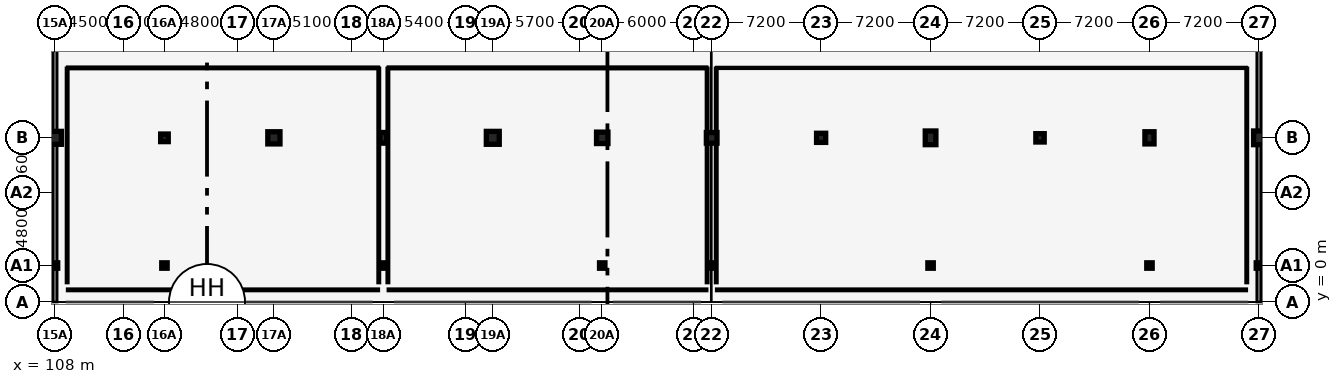
"""IFC4 building model, lengths in metres.
Left out: names, types, materials, properties, quantities, classifications, styles, units other than length and angle.
Written with IfcOpenShell. Run it as: python <this file> out.ifc"""

import sys

from ifc_helpers import new_model, si_unit, direction, frame, frame_2d, origin, origin_2d, place, context, subcontext, project, spatial, rectangle, circle, hollow_circle, extrude, element, fill, save


model = new_model("IFC4")
c1 = context("Model", 3, precision=1e-05, world=origin(), true_north=direction((0.0, 1.0)))
c2 = subcontext(c1, "Body", "Model", "MODEL_VIEW")
j1 = project(units=[si_unit("LENGTHUNIT", "METRE"), si_unit("PLANEANGLEUNIT", "RADIAN")], contexts=[c1])
p1 = place(None, origin())
s1 = spatial("IfcSite", under=j1, at=p1, CompositionType="ELEMENT")
p2 = place(p1, origin())
s2 = spatial("IfcBuilding", under=s1, at=p2, CompositionType="ELEMENT")
p3 = place(p2, frame((0.0, 0.0, 9.0)))
s3 = spatial("IfcBuildingStorey", under=s2, at=p3, CompositionType="ELEMENT", Elevation=9.0)
p4 = place(p3, frame((108.0, 10.8, 0.0), z_axis=(0.0, 0.0, 1.0), x_axis=(1.0, 0.0, 0.0)))
e1 = element("IfcColumn", 1, at=p4, inside=s3, PredefinedType="COLUMN", context=c2, shape_type="SweptSolid", body=[
    extrude(rectangle(XDim=0.85, YDim=0.85, at=origin_2d()), origin(), (0.0, 0.0, 1.0), 4.2),
])
p5 = place(p3, frame((115.2, 10.8, 0.0), z_axis=(0.0, 0.0, 1.0), x_axis=(1.0, 0.0, 0.0)))
e2 = element("IfcColumn", 2, at=p5, inside=s3, PredefinedType="COLUMN", context=c2, shape_type="SweptSolid", body=[
    extrude(rectangle(XDim=0.5, YDim=0.5, at=origin_2d()), origin(), (0.0, 0.0, 1.0), 4.2),
])
p6 = place(p3, frame((122.4, 10.8, 0.0), z_axis=(0.0, 0.0, 1.0), x_axis=(1.0, 0.0, 0.0)))
e3 = element("IfcColumn", 3, at=p6, inside=s3, PredefinedType="COLUMN", context=c2, shape_type="SweptSolid", body=[
    extrude(rectangle(XDim=0.8, YDim=0.8, at=origin_2d()), origin(), (0.0, 0.0, 1.0), 4.2),
])
p7 = place(p3, frame((129.6, 10.8, 0.0), z_axis=(0.0, 0.0, 1.0), x_axis=(1.0, 0.0, 0.0)))
e4 = element("IfcColumn", 4, at=p7, inside=s3, PredefinedType="COLUMN", context=c2, shape_type="SweptSolid", body=[
    extrude(rectangle(XDim=0.45, YDim=0.7, at=origin_2d()), origin(), (0.0, 0.0, 1.0), 4.2),
])
p8 = place(p3, frame((136.8, 10.8, 0.0), z_axis=(0.0, 0.0, 1.0), x_axis=(1.0, 0.0, 0.0)))
e5 = element("IfcColumn", 5, at=p8, inside=s3, PredefinedType="COLUMN", context=c2, shape_type="SweptSolid", body=[
    extrude(rectangle(XDim=0.85, YDim=0.85, at=origin_2d()), origin(), (0.0, 0.0, 1.0), 4.2),
])
p9 = place(p3, frame((144.0, 10.8, 0.0), z_axis=(0.0, 0.0, 1.0), x_axis=(1.0, 0.0, 0.0)))
e6 = element("IfcColumn", 6, at=p9, inside=s3, PredefinedType="COLUMN", context=c2, shape_type="SweptSolid", body=[
    extrude(circle(Radius=0.375, at=origin_2d()), origin(), (0.0, 0.0, 1.0), 4.2),
])
p10 = place(p3, frame((151.2, 10.8, 0.0), z_axis=(0.0, 0.0, 1.0), x_axis=(1.0, 0.0, 0.0)))
e7 = element("IfcColumn", 7, at=p10, inside=s3, PredefinedType="COLUMN", context=c2, shape_type="SweptSolid", body=[
    extrude(rectangle(XDim=0.7, YDim=0.7, at=origin_2d()), origin(), (0.0, 0.0, 1.0), 4.2),
])
p11 = place(p3, frame((158.4, 10.8, 0.0), z_axis=(0.0, 0.0, 1.0), x_axis=(1.0, 0.0, 0.0)))
e8 = element("IfcColumn", 8, at=p11, inside=s3, PredefinedType="COLUMN", context=c2, shape_type="SweptSolid", body=[
    extrude(circle(Radius=0.3, at=origin_2d()), origin(), (0.0, 0.0, 1.0), 4.2),
])
p12 = place(p3, frame((165.6, 10.8, 0.0), z_axis=(0.0, 0.0, 1.0), x_axis=(1.0, 0.0, 0.0)))
e9 = element("IfcColumn", 9, at=p12, inside=s3, PredefinedType="COLUMN", context=c2, shape_type="SweptSolid", body=[
    extrude(rectangle(XDim=0.7, YDim=0.9, at=origin_2d()), origin(), (0.0, 0.0, 1.0), 4.2),
])
p13 = place(p3, frame((172.8, 10.8, 0.0), z_axis=(0.0, 0.0, 1.0), x_axis=(1.0, 0.0, 0.0)))
e10 = element("IfcColumn", 10, at=p13, inside=s3, PredefinedType="COLUMN", context=c2, shape_type="SweptSolid", body=[
    extrude(rectangle(XDim=0.55, YDim=0.55, at=origin_2d()), origin(), (0.0, 0.0, 1.0), 4.2),
])
p14 = place(p3, frame((180.0, 10.8, 0.0), z_axis=(0.0, 0.0, 1.0), x_axis=(1.0, 0.0, 0.0)))
e11 = element("IfcColumn", 11, at=p14, inside=s3, PredefinedType="COLUMN", context=c2, shape_type="SweptSolid", body=[
    extrude(rectangle(XDim=0.6, YDim=0.8, at=origin_2d()), origin(), (0.0, 0.0, 1.0), 4.2),
])
p15 = place(p3, frame((187.2, 10.8, 0.0), z_axis=(0.0, 0.0, 1.0), x_axis=(1.0, 0.0, 0.0)))
e12 = element("IfcColumn", 12, at=p15, inside=s3, PredefinedType="COLUMN", context=c2, shape_type="SweptSolid", body=[
    extrude(rectangle(XDim=0.7, YDim=0.9, at=origin_2d()), origin(), (0.0, 0.0, 1.0), 4.2),
])
for number, where, z_axis, x_axis in (
    (13, (115.2, 2.4, 0.0), (0.0, 0.0, 1.0), (1.0, 0.0, 0.0)),
    (14, (129.6, 2.4, 0.0), (0.0, 0.0, 1.0), (1.0, 0.0, 0.0)),
    (15, (144.0, 2.4, 0.0), (0.0, 0.0, 1.0), (1.0, 0.0, 0.0)),
    (16, (151.2, 2.4, 0.0), (0.0, 0.0, 1.0), (1.0, 0.0, 0.0)),
    (17, (165.6, 2.4, 0.0), (0.0, 0.0, 1.0), (1.0, 0.0, 0.0)),
    (18, (180.0, 2.4, 0.0), (0.0, 0.0, 1.0), (1.0, 0.0, 0.0)),
    (19, (108.0, 2.4, 0.0), (0.0, 0.0, 1.0), (1.0, 0.0, 0.0)),
    (20, (187.2, 2.4, 0.0), (0.0, 0.0, 1.0), (1.0, 0.0, 0.0)),
):
    element("IfcColumn", number, at=place(p3, frame(where, z_axis=z_axis, x_axis=x_axis)), inside=s3, PredefinedType="COLUMN", context=c2, shape_type="SweptSolid", body=[
        extrude(hollow_circle(Radius=0.178, WallThickness=0.013, at=origin_2d()), origin(), (0.0, 0.0, 1.0), 4.2),
    ])
p16 = place(p3, frame((108.0, 54.0, 0.0), z_axis=(0.0, 0.0, 1.0), x_axis=(0.0, -1.0, 0.0)))
e21 = element("IfcWall", 21, at=p16, inside=s3, PredefinedType="SOLIDWALL", context=c2, shape_type="SweptSolid", body=[
    extrude(rectangle(XDim=54.0, YDim=0.28, at=frame_2d((27.0, 0.0))), origin(), (0.0, 0.0, 1.0), 3.4),
])
p17 = place(p16, frame((2.2, 0.0, 0.78)))
e22 = element("IfcOpeningElement", 22, at=p17, cuts=e21, PredefinedType="OPENING", context=c2, shape_type="SweptSolid", body=[
    extrude(rectangle(XDim=1.25, YDim=1.7, at=frame_2d((0.625, 0.85))), frame((0.0, 0.15, 0.0), z_axis=(0.0, -1.0, 0.0), x_axis=(1.0, 0.0, 0.0)), (0.0, 0.0, 1.0), 0.3),
])
p18 = place(p16, frame((16.6, 0.0, 0.78)))
e23 = element("IfcOpeningElement", 23, at=p18, cuts=e21, PredefinedType="OPENING", context=c2, shape_type="SweptSolid", body=[
    extrude(rectangle(XDim=1.5, YDim=1.75, at=frame_2d((0.75, 0.875))), frame((0.0, 0.15, 0.0), z_axis=(0.0, -1.0, 0.0), x_axis=(1.0, 0.0, 0.0)), (0.0, 0.0, 1.0), 0.3),
])
p19 = place(p16, frame((23.8, 0.0, 0.78)))
e24 = element("IfcOpeningElement", 24, at=p19, cuts=e21, PredefinedType="OPENING", context=c2, shape_type="SweptSolid", body=[
    extrude(rectangle(XDim=1.65, YDim=1.8, at=frame_2d((0.825, 0.9))), frame((0.0, 0.15, 0.0), z_axis=(0.0, -1.0, 0.0), x_axis=(1.0, 0.0, 0.0)), (0.0, 0.0, 1.0), 0.3),
])
p20 = place(p16, frame((31.0, 0.0, 0.78)))
e25 = element("IfcOpeningElement", 25, at=p20, cuts=e21, PredefinedType="OPENING", context=c2, shape_type="SweptSolid", body=[
    extrude(rectangle(XDim=1.95, YDim=1.8, at=frame_2d((0.975, 0.9))), frame((0.0, 0.15, 0.0), z_axis=(0.0, -1.0, 0.0), x_axis=(1.0, 0.0, 0.0)), (0.0, 0.0, 1.0), 0.3),
])
p21 = place(p16, frame((38.2, 0.0, 0.78)))
e26 = element("IfcOpeningElement", 26, at=p21, cuts=e21, PredefinedType="OPENING", context=c2, shape_type="SweptSolid", body=[
    extrude(rectangle(XDim=2.1, YDim=1.8, at=frame_2d((1.05, 0.9))), frame((0.0, 0.15, 0.0), z_axis=(0.0, -1.0, 0.0), x_axis=(1.0, 0.0, 0.0)), (0.0, 0.0, 1.0), 0.3),
])
p22 = place(p3, frame((187.2, 0.0, 0.0), z_axis=(0.0, 0.0, 1.0), x_axis=(0.0, 1.0, 0.0)))
e27 = element("IfcWall", 27, at=p22, inside=s3, PredefinedType="SOLIDWALL", context=c2, shape_type="SweptSolid", body=[
    extrude(rectangle(XDim=86.4, YDim=0.28, at=frame_2d((43.2, 0.0))), origin(), (0.0, 0.0, 1.0), 3.4),
])
p23 = place(p22, frame((38.2, 0.0, 0.78)))
e28 = element("IfcOpeningElement", 28, at=p23, cuts=e27, PredefinedType="OPENING", context=c2, shape_type="SweptSolid", body=[
    extrude(rectangle(XDim=1.25, YDim=1.7, at=frame_2d((0.625, 0.85))), frame((0.0, 0.15, 0.0), z_axis=(0.0, -1.0, 0.0), x_axis=(1.0, 0.0, 0.0)), (0.0, 0.0, 1.0), 0.3),
])
p24 = place(p22, frame((45.4, 0.0, 0.78)))
e29 = element("IfcOpeningElement", 29, at=p24, cuts=e27, PredefinedType="OPENING", context=c2, shape_type="SweptSolid", body=[
    extrude(rectangle(XDim=1.35, YDim=1.75, at=frame_2d((0.675, 0.875))), frame((0.0, 0.15, 0.0), z_axis=(0.0, -1.0, 0.0), x_axis=(1.0, 0.0, 0.0)), (0.0, 0.0, 1.0), 0.3),
])
p25 = place(p22, frame((59.8, 0.0, 0.78)))
e30 = element("IfcOpeningElement", 30, at=p25, cuts=e27, PredefinedType="OPENING", context=c2, shape_type="SweptSolid", body=[
    extrude(rectangle(XDim=1.65, YDim=1.8, at=frame_2d((0.825, 0.9))), frame((0.0, 0.15, 0.0), z_axis=(0.0, -1.0, 0.0), x_axis=(1.0, 0.0, 0.0)), (0.0, 0.0, 1.0), 0.3),
])
p26 = place(p22, frame((67.0, 0.0, 0.78)))
e31 = element("IfcOpeningElement", 31, at=p26, cuts=e27, PredefinedType="OPENING", context=c2, shape_type="SweptSolid", body=[
    extrude(rectangle(XDim=1.95, YDim=1.8, at=frame_2d((0.975, 0.9))), frame((0.0, 0.15, 0.0), z_axis=(0.0, -1.0, 0.0), x_axis=(1.0, 0.0, 0.0)), (0.0, 0.0, 1.0), 0.3),
])
p27 = place(p22, frame((74.2, 0.0, 0.78)))
e32 = element("IfcOpeningElement", 32, at=p27, cuts=e27, PredefinedType="OPENING", context=c2, shape_type="SweptSolid", body=[
    extrude(rectangle(XDim=2.1, YDim=1.8, at=frame_2d((1.05, 0.9))), frame((0.0, 0.15, 0.0), z_axis=(0.0, -1.0, 0.0), x_axis=(1.0, 0.0, 0.0)), (0.0, 0.0, 1.0), 0.3),
])
p28 = place(p3, frame((129.3, 0.8, 0.0), z_axis=(0.0, 0.0, 1.0), x_axis=(-1.0, 0.0, 0.0)))
e33 = element("IfcWall", 33, at=p28, inside=s3, PredefinedType="PARTITIONING", context=c2, shape_type="SweptSolid", body=[
    extrude(rectangle(XDim=20.5, YDim=0.15, at=frame_2d((10.25, 0.0))), origin(), (0.0, 0.0, 1.0), 3.502),
])
p29 = place(p3, frame((129.3, 1.25, 0.0), z_axis=(0.0, 0.0, 1.0), x_axis=(0.0, 1.0, 0.0)))
e34 = element("IfcWall", 34, at=p29, inside=s3, PredefinedType="PARTITIONING", context=c2, shape_type="SweptSolid", body=[
    extrude(rectangle(XDim=14.15, YDim=0.15, at=frame_2d((7.075, 0.0))), origin(), (0.0, 0.0, 1.0), 3.244),
])
p30 = place(p3, frame((108.8, 15.4, 0.0), z_axis=(0.0, 0.0, 1.0), x_axis=(0.0, -1.0, 0.0)))
e35 = element("IfcWall", 35, at=p30, inside=s3, PredefinedType="PARTITIONING", context=c2, shape_type="SweptSolid", body=[
    extrude(rectangle(XDim=14.15, YDim=0.15, at=frame_2d((7.075, 0.0))), origin(), (0.0, 0.0, 1.0), 3.002),
])
p31 = place(p3, frame((108.8, 15.4, 0.0), z_axis=(0.0, 0.0, 1.0), x_axis=(1.0, 0.0, 0.0)))
e36 = element("IfcWall", 36, at=p31, inside=s3, PredefinedType="PARTITIONING", context=c2, shape_type="SweptSolid", body=[
    extrude(rectangle(XDim=20.5, YDim=0.15, at=frame_2d((10.25, 0.0))), origin(), (0.0, 0.0, 1.0), 3.357),
])
p32 = place(p31, frame((9.765, 0.0, 0.0)))
e37 = element("IfcOpeningElement", 37, at=p32, cuts=e36, PredefinedType="OPENING", context=c2, shape_type="SweptSolid", body=[
    extrude(rectangle(XDim=0.97, YDim=2.15, at=frame_2d((0.485, 1.075))), frame((0.0, 0.085, 0.0), z_axis=(0.0, -1.0, 0.0), x_axis=(1.0, 0.0, 0.0)), (0.0, 0.0, 1.0), 0.17),
])
p33 = place(p3, frame((150.9, 0.8, 0.0), z_axis=(0.0, 0.0, 1.0), x_axis=(-1.0, 0.0, 0.0)))
e38 = element("IfcWall", 38, at=p33, inside=s3, PredefinedType="PARTITIONING", context=c2, shape_type="SweptSolid", body=[
    extrude(rectangle(XDim=21.0, YDim=0.15, at=frame_2d((10.5, 0.0))), origin(), (0.0, 0.0, 1.0), 3.502),
])
p34 = place(p3, frame((150.9, 1.25, 0.0), z_axis=(0.0, 0.0, 1.0), x_axis=(0.0, 1.0, 0.0)))
e39 = element("IfcWall", 39, at=p34, inside=s3, PredefinedType="PARTITIONING", context=c2, shape_type="SweptSolid", body=[
    extrude(rectangle(XDim=14.15, YDim=0.15, at=frame_2d((7.075, 0.0))), origin(), (0.0, 0.0, 1.0), 3.157),
])
p35 = place(p3, frame((129.9, 15.4, 0.0), z_axis=(0.0, 0.0, 1.0), x_axis=(0.0, -1.0, 0.0)))
e40 = element("IfcWall", 40, at=p35, inside=s3, PredefinedType="PARTITIONING", context=c2, shape_type="SweptSolid", body=[
    extrude(rectangle(XDim=14.15, YDim=0.15, at=frame_2d((7.075, 0.0))), origin(), (0.0, 0.0, 1.0), 3.207),
])
p36 = place(p3, frame((129.9, 15.4, 0.0), z_axis=(0.0, 0.0, 1.0), x_axis=(1.0, 0.0, 0.0)))
e41 = element("IfcWall", 41, at=p36, inside=s3, PredefinedType="PARTITIONING", context=c2, shape_type="SweptSolid", body=[
    extrude(rectangle(XDim=21.0, YDim=0.16, at=frame_2d((10.5, 0.0))), origin(), (0.0, 0.0, 1.0), 3.207),
])
p37 = place(p36, frame((10.0, 0.0, 0.0)))
e42 = element("IfcOpeningElement", 42, at=p37, cuts=e41, PredefinedType="OPENING", context=c2, shape_type="SweptSolid", body=[
    extrude(rectangle(XDim=1.0, YDim=2.15, at=frame_2d((0.5, 1.075))), frame((0.0, 0.09, 0.0), z_axis=(0.0, -1.0, 0.0), x_axis=(1.0, 0.0, 0.0)), (0.0, 0.0, 1.0), 0.18),
])
p38 = place(p3, frame((186.4, 0.8, 0.0), z_axis=(0.0, 0.0, 1.0), x_axis=(-1.0, 0.0, 0.0)))
e43 = element("IfcWall", 43, at=p38, inside=s3, PredefinedType="PARTITIONING", context=c2, shape_type="SweptSolid", body=[
    extrude(rectangle(XDim=34.9, YDim=0.15, at=frame_2d((17.45, 0.0))), origin(), (0.0, 0.0, 1.0), 3.502),
])
p39 = place(p3, frame((186.4, 1.25, 0.0), z_axis=(0.0, 0.0, 1.0), x_axis=(0.0, 1.0, 0.0)))
e44 = element("IfcWall", 44, at=p39, inside=s3, PredefinedType="PARTITIONING", context=c2, shape_type="SweptSolid", body=[
    extrude(rectangle(XDim=14.15, YDim=0.15, at=frame_2d((7.075, 0.0))), origin(), (0.0, 0.0, 1.0), 3.052),
])
p40 = place(p3, frame((151.5, 15.4, 0.0), z_axis=(0.0, 0.0, 1.0), x_axis=(0.0, -1.0, 0.0)))
e45 = element("IfcWall", 45, at=p40, inside=s3, PredefinedType="PARTITIONING", context=c2, shape_type="SweptSolid", body=[
    extrude(rectangle(XDim=14.15, YDim=0.15, at=frame_2d((7.075, 0.0))), origin(), (0.0, 0.0, 1.0), 3.157),
])
p41 = place(p3, frame((151.5, 15.4, 0.0), z_axis=(0.0, 0.0, 1.0), x_axis=(1.0, 0.0, 0.0)))
e46 = element("IfcWall", 46, at=p41, inside=s3, PredefinedType="PARTITIONING", context=c2, shape_type="SweptSolid", body=[
    extrude(rectangle(XDim=34.9, YDim=0.11, at=frame_2d((17.45, 0.0))), origin(), (0.0, 0.0, 1.0), 2.957),
])
p42 = place(p41, frame((16.965, 0.0, 0.0)))
e47 = element("IfcOpeningElement", 47, at=p42, cuts=e46, PredefinedType="OPENING", context=c2, shape_type="SweptSolid", body=[
    extrude(rectangle(XDim=0.97, YDim=2.15, at=frame_2d((0.485, 1.075))), frame((0.0, 0.065, 0.0), z_axis=(0.0, -1.0, 0.0), x_axis=(1.0, 0.0, 0.0)), (0.0, 0.0, 1.0), 0.13),
])
p43 = place(p41, frame((30.73, 0.0, 0.0)))
e48 = element("IfcOpeningElement", 48, at=p43, cuts=e46, PredefinedType="OPENING", context=c2, shape_type="SweptSolid", body=[
    extrude(rectangle(XDim=0.97, YDim=2.15, at=frame_2d((0.485, 1.075))), frame((0.0, 0.065, 0.0), z_axis=(0.0, -1.0, 0.0), x_axis=(1.0, 0.0, 0.0)), (0.0, 0.0, 1.0), 0.13),
])
p44 = place(p21, origin())
e49 = element("IfcWindow", 49, at=p44, inside=s3, PartitioningType="SINGLE_PANEL", PredefinedType="WINDOW", context=c2, shape_type="SweptSolid", body=[
    extrude(rectangle(XDim=2.1, YDim=1.8, at=frame_2d((1.05, 0.9))), frame((0.0, 0.03, 0.0), z_axis=(0.0, -1.0, 0.0), x_axis=(1.0, 0.0, 0.0)), (0.0, 0.0, 1.0), 0.06),
])
fill(e26, e49)
p45 = place(p32, origin())
e50 = element("IfcDoor", 50, at=p45, inside=s3, OperationType="SINGLE_SWING_RIGHT", PredefinedType="DOOR", context=c2, shape_type="SweptSolid", body=[
    extrude(rectangle(XDim=0.97, YDim=2.15, at=frame_2d((0.485, 1.075))), frame((0.0, 0.025, 0.0), z_axis=(0.0, -1.0, 0.0), x_axis=(1.0, 0.0, 0.0)), (0.0, 0.0, 1.0), 0.05),
])
fill(e37, e50)
p46 = place(p37, origin())
e51 = element("IfcDoor", 51, at=p46, inside=s3, OperationType="SINGLE_SWING_LEFT", PredefinedType="DOOR", context=c2, shape_type="SweptSolid", body=[
    extrude(rectangle(XDim=1.0, YDim=2.15, at=frame_2d((0.5, 1.075))), frame((0.0, 0.025, 0.0), z_axis=(0.0, -1.0, 0.0), x_axis=(1.0, 0.0, 0.0)), (0.0, 0.0, 1.0), 0.05),
])
fill(e42, e51)
p47 = place(p42, origin())
e52 = element("IfcDoor", 52, at=p47, inside=s3, OperationType="SINGLE_SWING_RIGHT", PredefinedType="DOOR", context=c2, shape_type="SweptSolid", body=[
    extrude(rectangle(XDim=0.97, YDim=2.15, at=frame_2d((0.485, 1.075))), frame((0.0, 0.025, 0.0), z_axis=(0.0, -1.0, 0.0), x_axis=(1.0, 0.0, 0.0)), (0.0, 0.0, 1.0), 0.05),
])
fill(e47, e52)
p48 = place(p43, origin())
e53 = element("IfcDoor", 53, at=p48, inside=s3, OperationType="SINGLE_SWING_RIGHT", PredefinedType="DOOR", context=c2, shape_type="SweptSolid", body=[
    extrude(rectangle(XDim=0.97, YDim=2.15, at=frame_2d((0.485, 1.075))), frame((0.0, 0.025, 0.0), z_axis=(0.0, -1.0, 0.0), x_axis=(1.0, 0.0, 0.0)), (0.0, 0.0, 1.0), 0.05),
])
fill(e48, e53)
save(model, sys.argv[1])
